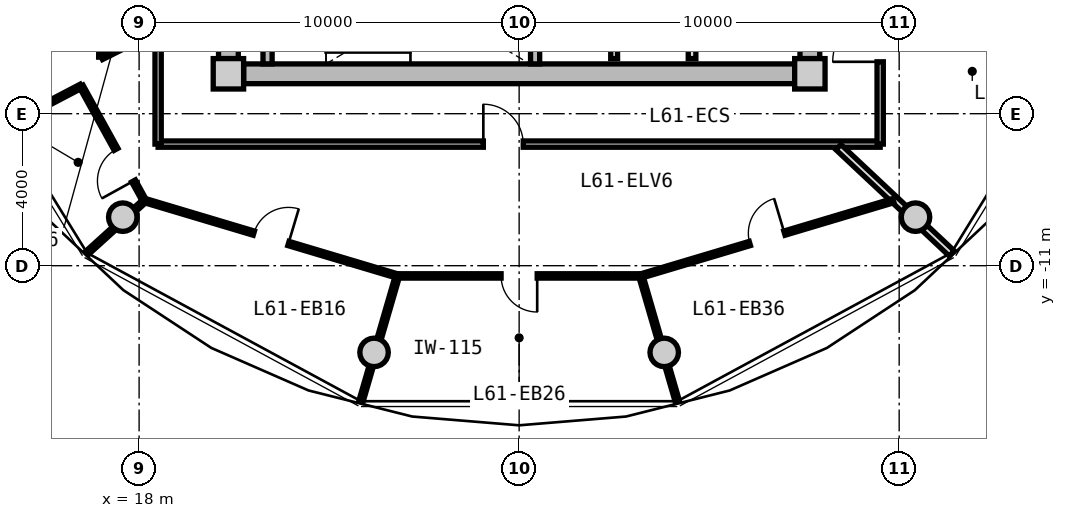
"""IFC4 building model, lengths in metres.
Left out: names, types, materials, properties, quantities, classifications, styles, units other than length and angle.
Written with IfcOpenShell. Run it as: python <this file> out.ifc"""

import sys

from ifc_helpers import new_model, si_unit, direction, frame, frame_2d, origin, origin_2d, place, context, subcontext, project, spatial, rectangle, circle, extrude, source, transform, mapped, element, fill, save


model = new_model("IFC4")
c1 = context("Model", 3, precision=1e-05, world=origin(), true_north=direction((0.0, 1.0)))
c2 = subcontext(c1, "Body", "Model", "MODEL_VIEW")
j1 = project(units=[si_unit("LENGTHUNIT", "METRE"), si_unit("PLANEANGLEUNIT", "RADIAN")], contexts=[c1])
p1 = place(None, origin())
s1 = spatial("IfcSite", under=j1, at=p1, CompositionType="ELEMENT")
p2 = place(p1, origin())
s2 = spatial("IfcBuilding", under=s1, at=p2, CompositionType="ELEMENT")
p3 = place(p2, frame((0.0, 0.0, 196.75)))
s3 = spatial("IfcBuildingStorey", under=s2, at=p3, CompositionType="ELEMENT", Elevation=196.75)
m1 = source(origin(), c2, "Body", "SweptSolid", [
    extrude(rectangle(XDim=0.8, YDim=0.8, at=origin_2d()), origin(), (0.0, 0.0, 1.0), 3.05),
])
for number, where, z_axis, x_axis in (
    (1, (20.35, -5.95, 0.0), (0.0, 0.0, 1.0), (1.0, 0.0, 0.0)),
    (2, (35.65, -5.95, 0.0), (0.0, 0.0, 1.0), (1.0, 0.0, 0.0)),
):
    element("IfcColumn", number, at=place(p3, frame(where, z_axis=z_axis, x_axis=x_axis)), inside=s3, PredefinedType="COLUMN", context=c2, shape_type="MappedRepresentation", body=[
        mapped(m1, transform((0.0, 0.0, 0.0), x_axis=(1.0, 0.0, 0.0), y_axis=(0.0, 1.0, 0.0), z_axis=(0.0, 0.0, 1.0), scale=1.0)),
    ])
m2 = source(origin(), c2, "Body", "SweptSolid", [
    extrude(rectangle(XDim=14.5, YDim=0.52, at=frame_2d((7.25, 0.0))), origin(), (0.0, 0.0, 1.0), 2.76),
])
p4 = place(p3, frame((35.25, -5.95, 0.0), z_axis=(0.0, 0.0, 1.0), x_axis=(-1.0, 0.0, 0.0)))
e3 = element("IfcWall", 3, at=p4, inside=s3, PredefinedType="SHEAR", context=c2, shape_type="MappedRepresentation", body=[
    mapped(m2, transform((0.0, 0.0, 0.0), x_axis=(1.0, 0.0, 0.0), y_axis=(0.0, 1.0, 0.0), z_axis=(0.0, 0.0, 1.0), scale=1.0)),
])
m3 = source(origin(), c2, "Body", "SweptSolid", [
    extrude(rectangle(XDim=11.1, YDim=0.52, at=frame_2d((5.55, 0.0))), origin(), (0.0, 0.0, 1.0), 2.76),
])
p5 = place(p3, frame((20.35, -5.55, 0.0), z_axis=(0.0, 0.0, 1.0), x_axis=(0.0, 1.0, 0.0)))
e4 = element("IfcWall", 4, at=p5, inside=s3, PredefinedType="SHEAR", context=c2, shape_type="MappedRepresentation", body=[
    mapped(m3, transform((0.0, 0.0, 0.0), x_axis=(1.0, 0.0, 0.0), y_axis=(0.0, 1.0, 0.0), z_axis=(0.0, 0.0, 1.0), scale=1.0)),
])
p6 = place(p5, frame((3.8, 0.0, 0.0)))
e5 = element("IfcOpeningElement", 5, at=p6, cuts=e4, PredefinedType="OPENING", context=c2, shape_type="SweptSolid", body=[
    extrude(rectangle(XDim=1.2, YDim=2.15, at=frame_2d((0.6, 1.075))), frame((0.0, 0.27, 0.0), z_axis=(0.0, -1.0, 0.0), x_axis=(1.0, 0.0, 0.0)), (0.0, 0.0, 1.0), 0.54),
])
p7 = place(p3, frame((35.65, 5.55, 0.0), z_axis=(0.0, 0.0, 1.0), x_axis=(0.0, -1.0, 0.0)))
e6 = element("IfcWall", 6, at=p7, inside=s3, PredefinedType="SHEAR", context=c2, shape_type="MappedRepresentation", body=[
    mapped(m3, transform((0.0, 0.0, 0.0), x_axis=(1.0, 0.0, 0.0), y_axis=(0.0, 1.0, 0.0), z_axis=(0.0, 0.0, 1.0), scale=1.0)),
])
p8 = place(p7, frame((5.65, 0.0, 0.0)))
e7 = element("IfcOpeningElement", 7, at=p8, cuts=e6, PredefinedType="OPENING", context=c2, shape_type="SweptSolid", body=[
    extrude(rectangle(XDim=1.2, YDim=2.15, at=frame_2d((0.6, 1.075))), frame((0.0, 0.27, 0.0), z_axis=(0.0, -1.0, 0.0), x_axis=(1.0, 0.0, 0.0)), (0.0, 0.0, 1.0), 0.54),
])
m4 = source(origin(), c2, "Body", "SweptSolid", [
    extrude(circle(Radius=0.375, at=origin_2d()), origin(), (0.0, 0.0, 1.0), 3.05),
])
for number, where, z_axis, x_axis in (
    (8, (17.57, -9.723, 0.0), (0.0, 0.0, 1.0), (1.0, 0.0, 0.0)),
    (9, (24.182, -13.281, 0.0), (0.0, 0.0, 1.0), (1.0, 0.0, 0.0)),
    (10, (31.818, -13.281, 0.0), (0.0, 0.0, 1.0), (1.0, 0.0, 0.0)),
    (11, (38.43, -9.723, 0.0), (0.0, 0.0, 1.0), (1.0, 0.0, 0.0)),
):
    element("IfcColumn", number, at=place(p3, frame(where, z_axis=z_axis, x_axis=x_axis)), inside=s3, PredefinedType="COLUMN", context=c2, shape_type="MappedRepresentation", body=[
        mapped(m4, transform((0.0, 0.0, 0.0), x_axis=(1.0, 0.0, 0.0), y_axis=(0.0, 1.0, 0.0), z_axis=(0.0, 0.0, 1.0), scale=1.0)),
    ])
m5 = source(origin(), c2, "Body", "SweptSolid", [
    extrude(rectangle(XDim=3.24, YDim=0.24, at=frame_2d((1.62, 0.0))), origin(), (0.0, 0.0, 1.0), 2.76),
])
for number, where, z_axis, x_axis in (
    (12, (21.38, -5.69, 0.0), (0.0, 0.0, 1.0), (0.0, 1.0, 0.0)),
    (13, (28.42, -5.69, 0.0), (0.0, 0.0, 1.0), (0.0, 1.0, 0.0)),
):
    element("IfcWall", number, at=place(p3, frame(where, z_axis=z_axis, x_axis=x_axis)), inside=s3, PredefinedType="PARTITIONING", context=c2, shape_type="MappedRepresentation", body=[
        mapped(m5, transform((0.0, 0.0, 0.0), x_axis=(1.0, 0.0, 0.0), y_axis=(0.0, 1.0, 0.0), z_axis=(0.0, 0.0, 1.0), scale=1.0)),
    ])
m6 = source(origin(), c2, "Body", "SweptSolid", [
    extrude(rectangle(XDim=3.8, YDim=0.2, at=frame_2d((1.9, 0.0))), origin(), (0.0, 0.0, 1.0), 2.745),
])
p9 = place(p3, frame((32.55, -5.55, 0.0), z_axis=(0.0, 0.0, 1.0), x_axis=(0.0, 1.0, 0.0)))
e14 = element("IfcWall", 14, at=p9, inside=s3, PredefinedType="PARTITIONING", context=c2, shape_type="MappedRepresentation", body=[
    mapped(m6, transform((0.0, 0.0, 0.0), x_axis=(1.0, 0.0, 0.0), y_axis=(0.0, 1.0, 0.0), z_axis=(0.0, 0.0, 1.0), scale=1.0)),
])
m7 = source(origin(), c2, "Body", "SweptSolid", [
    extrude(rectangle(XDim=4.2, YDim=0.18, at=frame_2d((2.1, 0.0))), origin(), (0.0, 0.0, 1.0), 2.745),
])
p10 = place(p3, frame((30.5, -5.55, 0.0), z_axis=(0.0, 0.0, 1.0), x_axis=(0.0, 1.0, 0.0)))
e15 = element("IfcWall", 15, at=p10, inside=s3, PredefinedType="PARTITIONING", context=c2, shape_type="MappedRepresentation", body=[
    mapped(m7, transform((0.0, 0.0, 0.0), x_axis=(1.0, 0.0, 0.0), y_axis=(0.0, 1.0, 0.0), z_axis=(0.0, 0.0, 1.0), scale=1.0)),
])
m8 = source(origin(), c2, "Body", "SweptSolid", [
    extrude(rectangle(XDim=19.0, YDim=0.165, at=frame_2d((9.5, 0.0))), origin(), (0.0, 0.0, 1.0), 2.745),
])
p11 = place(p3, frame((37.5, -7.8, 0.0), z_axis=(0.0, 0.0, 1.0), x_axis=(-1.0, 0.0, 0.0)))
e16 = element("IfcWall", 16, at=p11, inside=s3, PredefinedType="PARTITIONING", context=c2, shape_type="MappedRepresentation", body=[
    mapped(m8, transform((0.0, 0.0, 0.0), x_axis=(1.0, 0.0, 0.0), y_axis=(0.0, 1.0, 0.0), z_axis=(0.0, 0.0, 1.0), scale=1.0)),
])
p12 = place(p11, frame((9.392, 0.0, 0.0)))
e17 = element("IfcOpeningElement", 17, at=p12, cuts=e16, PredefinedType="OPENING", context=c2, shape_type="SweptSolid", body=[
    extrude(rectangle(XDim=1.05, YDim=2.15, at=frame_2d((0.525, 1.075))), frame((0.0, 0.093, 0.0), z_axis=(0.0, -1.0, 0.0), x_axis=(1.0, 0.0, 0.0)), (0.0, 0.0, 1.0), 0.185),
])
m9 = source(origin(), c2, "Body", "SweptSolid", [
    extrude(rectangle(XDim=6.88, YDim=0.165, at=frame_2d((3.44, 0.0))), origin(), (0.0, 0.0, 1.0), 2.745),
])
p13 = place(p3, frame((18.5, -7.8, 0.0), z_axis=(0.0, 0.0, 1.0), x_axis=(0.0, 1.0, 0.0)))
e18 = element("IfcWall", 18, at=p13, inside=s3, PredefinedType="PARTITIONING", context=c2, shape_type="MappedRepresentation", body=[
    mapped(m9, transform((0.0, 0.0, 0.0), x_axis=(1.0, 0.0, 0.0), y_axis=(0.0, 1.0, 0.0), z_axis=(0.0, 0.0, 1.0), scale=1.0)),
])
p14 = place(p3, frame((37.5, -0.92, 0.0), z_axis=(0.0, 0.0, 1.0), x_axis=(0.0, -1.0, 0.0)))
e19 = element("IfcWall", 19, at=p14, inside=s3, PredefinedType="PARTITIONING", context=c2, shape_type="MappedRepresentation", body=[
    mapped(m9, transform((0.0, 0.0, 0.0), x_axis=(1.0, 0.0, 0.0), y_axis=(0.0, 1.0, 0.0), z_axis=(0.0, 0.0, 1.0), scale=1.0)),
])
p15 = place(p14, frame((3.464, 0.0, 0.0)))
e20 = element("IfcOpeningElement", 20, at=p15, cuts=e19, PredefinedType="OPENING", context=c2, shape_type="SweptSolid", body=[
    extrude(rectangle(XDim=1.25, YDim=2.2, at=frame_2d((0.625, 1.1))), frame((0.0, 0.093, 0.0), z_axis=(0.0, -1.0, 0.0), x_axis=(1.0, 0.0, 0.0)), (0.0, 0.0, 1.0), 0.185),
])
m10 = source(origin(), c2, "Body", "SweptSolid", [
    extrude(rectangle(XDim=4.089, YDim=0.19, at=frame_2d((2.044, 0.0))), origin(), (0.0, 0.0, 1.0), 2.345),
])
p16 = place(p3, frame((36.402, -7.88, 0.0), z_axis=(0.0, 0.0, 1.0), x_axis=(0.729401273609, -0.684086092577, 0.0)))
e21 = element("IfcWall", 21, at=p16, inside=s3, PredefinedType="PARTITIONING", context=c2, shape_type="MappedRepresentation", body=[
    mapped(m10, transform((0.0, 0.0, 0.0), x_axis=(1.0, 0.0, 0.0), y_axis=(0.0, 1.0, 0.0), z_axis=(0.0, 0.0, 1.0), scale=1.0)),
])
m11 = source(origin(), c2, "Body", "SweptSolid", [
    extrude(rectangle(XDim=6.936, YDim=0.115, at=frame_2d((3.468, 0.0))), origin(), (0.0, 0.0, 1.0), 2.745),
])
p17 = place(p3, frame((18.151, -9.287, 0.0), z_axis=(0.0, 0.0, 1.0), x_axis=(0.958186895835, -0.286143098205, 0.0)))
e22 = element("IfcWall", 22, at=p17, inside=s3, PredefinedType="PARTITIONING", context=c2, shape_type="MappedRepresentation", body=[
    mapped(m11, transform((0.0, 0.0, 0.0), x_axis=(1.0, 0.0, 0.0), y_axis=(0.0, 1.0, 0.0), z_axis=(0.0, 0.0, 1.0), scale=1.0)),
])
p18 = place(p17, frame((2.993, 0.0, 0.0)))
e23 = element("IfcOpeningElement", 23, at=p18, cuts=e22, PredefinedType="OPENING", context=c2, shape_type="SweptSolid", body=[
    extrude(rectangle(XDim=0.95, YDim=2.1, at=frame_2d((0.475, 1.05))), frame((0.0, 0.067, 0.0), z_axis=(0.0, -1.0, 0.0), x_axis=(1.0, 0.0, 0.0)), (0.0, 0.0, 1.0), 0.135),
])
m12 = source(origin(), c2, "Body", "SweptSolid", [
    extrude(rectangle(XDim=2.072, YDim=0.115, at=frame_2d((1.036, 0.0))), origin(), (0.0, 0.0, 1.0), 2.345),
])
p19 = place(p3, frame((18.151, -9.287, 0.0), z_axis=(0.0, 0.0, 1.0), x_axis=(-0.741410125356, -0.671052178314, 0.0)))
e24 = element("IfcWall", 24, at=p19, inside=s3, PredefinedType="PARTITIONING", context=c2, shape_type="MappedRepresentation", body=[
    mapped(m12, transform((0.0, 0.0, 0.0), x_axis=(1.0, 0.0, 0.0), y_axis=(0.0, 1.0, 0.0), z_axis=(0.0, 0.0, 1.0), scale=1.0)),
])
m13 = source(origin(), c2, "Body", "SweptSolid", [
    extrude(rectangle(XDim=6.404, YDim=0.115, at=frame_2d((3.202, 0.0))), origin(), (0.0, 0.0, 1.0), 2.745),
])
p20 = place(p3, frame((24.798, -11.269, 0.0), z_axis=(0.0, 0.0, 1.0), x_axis=(1.0, 0.0, 0.0)))
e25 = element("IfcWall", 25, at=p20, inside=s3, PredefinedType="PARTITIONING", context=c2, shape_type="MappedRepresentation", body=[
    mapped(m13, transform((0.0, 0.0, 0.0), x_axis=(1.0, 0.0, 0.0), y_axis=(0.0, 1.0, 0.0), z_axis=(0.0, 0.0, 1.0), scale=1.0)),
])
p21 = place(p20, frame((2.727, 0.0, 0.0)))
e26 = element("IfcOpeningElement", 26, at=p21, cuts=e25, PredefinedType="OPENING", context=c2, shape_type="SweptSolid", body=[
    extrude(rectangle(XDim=0.95, YDim=2.1, at=frame_2d((0.475, 1.05))), frame((0.0, 0.067, 0.0), z_axis=(0.0, -1.0, 0.0), x_axis=(1.0, 0.0, 0.0)), (0.0, 0.0, 1.0), 0.135),
])
m14 = source(origin(), c2, "Body", "SweptSolid", [
    extrude(rectangle(XDim=3.454, YDim=0.115, at=frame_2d((1.727, 0.0))), origin(), (0.0, 0.0, 1.0), 2.345),
])
p22 = place(p3, frame((24.798, -11.269, 0.0), z_axis=(0.0, 0.0, 1.0), x_axis=(-0.279348499358, -0.960189781193, 0.0)))
e27 = element("IfcWall", 27, at=p22, inside=s3, PredefinedType="PARTITIONING", context=c2, shape_type="MappedRepresentation", body=[
    mapped(m14, transform((0.0, 0.0, 0.0), x_axis=(1.0, 0.0, 0.0), y_axis=(0.0, 1.0, 0.0), z_axis=(0.0, 0.0, 1.0), scale=1.0)),
])
p23 = place(p3, frame((31.203, -11.272, 0.0), z_axis=(0.0, 0.0, 1.0), x_axis=(0.958186895835, 0.286143098205, 0.0)))
e28 = element("IfcWall", 28, at=p23, inside=s3, PredefinedType="PARTITIONING", context=c2, shape_type="MappedRepresentation", body=[
    mapped(m11, transform((0.0, 0.0, 0.0), x_axis=(1.0, 0.0, 0.0), y_axis=(0.0, 1.0, 0.0), z_axis=(0.0, 0.0, 1.0), scale=1.0)),
])
p24 = place(p23, frame((2.993, 0.0, 0.0)))
e29 = element("IfcOpeningElement", 29, at=p24, cuts=e28, PredefinedType="OPENING", context=c2, shape_type="SweptSolid", body=[
    extrude(rectangle(XDim=0.95, YDim=2.1, at=frame_2d((0.475, 1.05))), frame((0.0, 0.067, 0.0), z_axis=(0.0, -1.0, 0.0), x_axis=(1.0, 0.0, 0.0)), (0.0, 0.0, 1.0), 0.135),
])
m15 = source(origin(), c2, "Body", "SweptSolid", [
    extrude(rectangle(XDim=3.451, YDim=0.115, at=frame_2d((1.726, 0.0))), origin(), (0.0, 0.0, 1.0), 2.345),
])
p25 = place(p3, frame((31.203, -11.272, 0.0), z_axis=(0.0, 0.0, 1.0), x_axis=(0.279361559083, -0.960185981624, 0.0)))
e30 = element("IfcWall", 30, at=p25, inside=s3, PredefinedType="PARTITIONING", context=c2, shape_type="MappedRepresentation", body=[
    mapped(m15, transform((0.0, 0.0, 0.0), x_axis=(1.0, 0.0, 0.0), y_axis=(0.0, 1.0, 0.0), z_axis=(0.0, 0.0, 1.0), scale=1.0)),
])
m16 = source(origin(), c2, "Body", "SweptSolid", [
    extrude(rectangle(XDim=1.638, YDim=0.14, at=frame_2d((0.819, 0.0))), origin(), (0.0, 0.0, 1.0), 2.745),
])
p26 = place(p3, frame((18.47, -4.778, 0.0), z_axis=(0.0, 0.0, 1.0), x_axis=(-0.893919977945, -0.448226586707, 0.0)))
e31 = element("IfcWall", 31, at=p26, inside=s3, PredefinedType="PARTITIONING", context=c2, shape_type="MappedRepresentation", body=[
    mapped(m16, transform((0.0, 0.0, 0.0), x_axis=(1.0, 0.0, 0.0), y_axis=(0.0, 1.0, 0.0), z_axis=(0.0, 0.0, 1.0), scale=1.0)),
])
m17 = source(origin(), c2, "Body", "SweptSolid", [
    extrude(rectangle(XDim=2.759, YDim=0.14, at=frame_2d((1.379, 0.0))), origin(), (0.0, 0.0, 1.0), 2.745),
])
p27 = place(p3, frame((17.005, -5.513, 0.0), z_axis=(0.0, 0.0, 1.0), x_axis=(0.01194710728, 0.999928630767, 0.0)))
e32 = element("IfcWall", 32, at=p27, inside=s3, PredefinedType="PARTITIONING", context=c2, shape_type="MappedRepresentation", body=[
    mapped(m17, transform((0.0, 0.0, 0.0), x_axis=(1.0, 0.0, 0.0), y_axis=(0.0, 1.0, 0.0), z_axis=(0.0, 0.0, 1.0), scale=1.0)),
])
p28 = place(p27, frame((0.919, 0.0, 0.0)))
e33 = element("IfcOpeningElement", 33, at=p28, cuts=e32, PredefinedType="OPENING", context=c2, shape_type="SweptSolid", body=[
    extrude(rectangle(XDim=0.92, YDim=2.1, at=frame_2d((0.46, 1.05))), frame((0.0, 0.08, 0.0), z_axis=(0.0, -1.0, 0.0), x_axis=(1.0, 0.0, 0.0)), (0.0, 0.0, 1.0), 0.16),
])
m18 = source(origin(), c2, "Body", "SweptSolid", [
    extrude(rectangle(XDim=2.193, YDim=0.115, at=frame_2d((1.097, 0.0))), origin(), (0.0, 0.0, 1.0), 2.745),
])
p29 = place(p3, frame((16.475, -6.275, 0.0), z_axis=(0.0, 0.0, 1.0), x_axis=(-0.885783595046, -0.464098505435, 0.0)))
e34 = element("IfcWall", 34, at=p29, inside=s3, PredefinedType="PARTITIONING", context=c2, shape_type="MappedRepresentation", body=[
    mapped(m18, transform((0.0, 0.0, 0.0), x_axis=(1.0, 0.0, 0.0), y_axis=(0.0, 1.0, 0.0), z_axis=(0.0, 0.0, 1.0), scale=1.0)),
])
m19 = source(origin(), c2, "Body", "SweptSolid", [
    extrude(rectangle(XDim=3.45, YDim=0.115, at=frame_2d((1.725, 0.0))), origin(), (0.0, 0.0, 1.0), 2.745),
])
p30 = place(p3, frame((16.475, -6.275, 0.0), z_axis=(0.0, 0.0, 1.0), x_axis=(0.483659007882, -0.875256513312, 0.0)))
e35 = element("IfcWall", 35, at=p30, inside=s3, PredefinedType="PARTITIONING", context=c2, shape_type="MappedRepresentation", body=[
    mapped(m19, transform((0.0, 0.0, 0.0), x_axis=(1.0, 0.0, 0.0), y_axis=(0.0, 1.0, 0.0), z_axis=(0.0, 0.0, 1.0), scale=1.0)),
])
p31 = place(p30, frame((1.9, 0.0, 0.0)))
e36 = element("IfcOpeningElement", 36, at=p31, cuts=e35, PredefinedType="OPENING", context=c2, shape_type="SweptSolid", body=[
    extrude(rectangle(XDim=0.95, YDim=2.1, at=frame_2d((0.475, 1.05))), frame((0.0, 0.067, 0.0), z_axis=(0.0, -1.0, 0.0), x_axis=(1.0, 0.0, 0.0)), (0.0, 0.0, 1.0), 0.135),
])
m20 = source(origin(), c2, "Body", "SweptSolid", [
    extrude(rectangle(XDim=1.05, YDim=2.15, at=frame_2d((0.525, 1.075))), frame((0.0, 0.025, 0.0), z_axis=(0.0, -1.0, 0.0), x_axis=(1.0, 0.0, 0.0)), (0.0, 0.0, 1.0), 0.05),
])
p32 = place(p12, frame((1.05, 0.0, 0.0), z_axis=(0.0, 0.0, 1.0), x_axis=(-1.0, 0.0, 0.0)))
e37 = element("IfcDoor", 37, at=p32, inside=s3, OperationType="SINGLE_SWING_LEFT", PredefinedType="DOOR", context=c2, shape_type="MappedRepresentation", body=[
    mapped(m20, transform((0.0, 0.0, 0.0), x_axis=(1.0, 0.0, 0.0), y_axis=(0.0, 1.0, 0.0), z_axis=(0.0, 0.0, 1.0), scale=1.0)),
])
fill(e17, e37)
m21 = source(origin(), c2, "Body", "SweptSolid", [
    extrude(rectangle(XDim=0.95, YDim=2.1, at=frame_2d((0.475, 1.05))), frame((0.0, 0.025, 0.0), z_axis=(0.0, -1.0, 0.0), x_axis=(1.0, 0.0, 0.0)), (0.0, 0.0, 1.0), 0.05),
])
p33 = place(p31, frame((0.95, 0.0, 0.0), z_axis=(0.0, 0.0, 1.0), x_axis=(-1.0, 0.0, 0.0)))
e38 = element("IfcDoor", 38, at=p33, inside=s3, OperationType="SINGLE_SWING_LEFT", PredefinedType="DOOR", context=c2, shape_type="MappedRepresentation", body=[
    mapped(m21, transform((0.0, 0.0, 0.0), x_axis=(1.0, 0.0, 0.0), y_axis=(0.0, 1.0, 0.0), z_axis=(0.0, 0.0, 1.0), scale=1.0)),
])
fill(e36, e38)
p34 = place(p18, origin())
e39 = element("IfcDoor", 39, at=p34, inside=s3, OperationType="SINGLE_SWING_RIGHT", PredefinedType="DOOR", context=c2, shape_type="MappedRepresentation", body=[
    mapped(m21, transform((0.0, 0.0, 0.0), x_axis=(1.0, 0.0, 0.0), y_axis=(0.0, 1.0, 0.0), z_axis=(0.0, 0.0, 1.0), scale=1.0)),
])
fill(e23, e39)
p35 = place(p21, frame((0.95, 0.0, 0.0), z_axis=(0.0, 0.0, 1.0), x_axis=(-1.0, 0.0, 0.0)))
e40 = element("IfcDoor", 40, at=p35, inside=s3, OperationType="SINGLE_SWING_LEFT", PredefinedType="DOOR", context=c2, shape_type="MappedRepresentation", body=[
    mapped(m21, transform((0.0, 0.0, 0.0), x_axis=(1.0, 0.0, 0.0), y_axis=(0.0, 1.0, 0.0), z_axis=(0.0, 0.0, 1.0), scale=1.0)),
])
fill(e26, e40)
p36 = place(p24, origin())
e41 = element("IfcDoor", 41, at=p36, inside=s3, OperationType="SINGLE_SWING_RIGHT", PredefinedType="DOOR", context=c2, shape_type="MappedRepresentation", body=[
    mapped(m21, transform((0.0, 0.0, 0.0), x_axis=(1.0, 0.0, 0.0), y_axis=(0.0, 1.0, 0.0), z_axis=(0.0, 0.0, 1.0), scale=1.0)),
])
fill(e29, e41)
m22 = source(origin(), c2, "Body", "SweptSolid", [
    extrude(rectangle(XDim=1.25, YDim=2.2, at=frame_2d((0.625, 1.1))), frame((0.0, 0.025, 0.0), z_axis=(0.0, -1.0, 0.0), x_axis=(1.0, 0.0, 0.0)), (0.0, 0.0, 1.0), 0.05),
])
p37 = place(p15, frame((1.25, 0.0, 0.0), z_axis=(0.0, 0.0, 1.0), x_axis=(-1.0, 0.0, 0.0)))
e42 = element("IfcDoor", 42, at=p37, inside=s3, OperationType="SINGLE_SWING_LEFT", PredefinedType="DOOR", context=c2, shape_type="MappedRepresentation", body=[
    mapped(m22, transform((0.0, 0.0, 0.0), x_axis=(1.0, 0.0, 0.0), y_axis=(0.0, 1.0, 0.0), z_axis=(0.0, 0.0, 1.0), scale=1.0)),
])
fill(e20, e42)
save(model, sys.argv[1])
